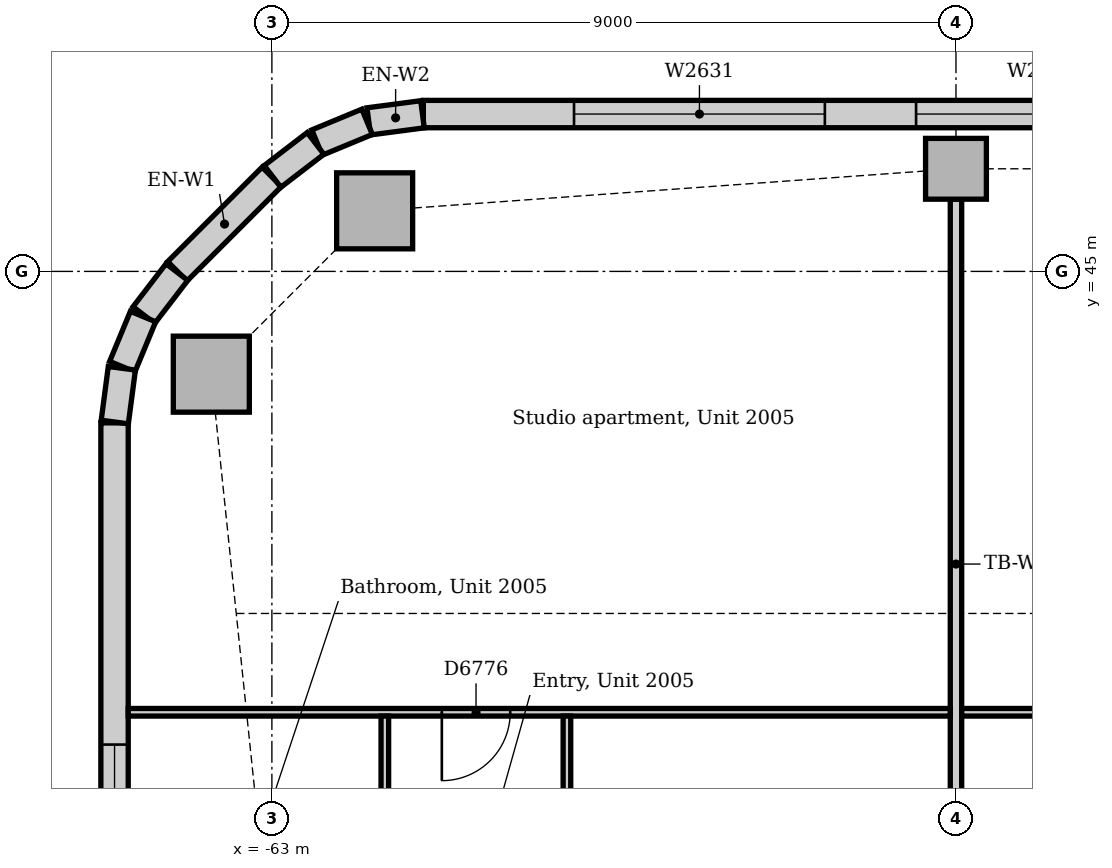
"""IFC4 building model, lengths in metres.
Left out: names, types, materials, properties, quantities, classifications, styles, units other than length and angle.
Written with IfcOpenShell. Run it as: python <this file> out.ifc"""

import sys

from ifc_helpers import new_model, si_unit, direction, frame, frame_2d, origin, origin_2d, place, context, subcontext, project, spatial, rectangle, extrude, element, fill, save


model = new_model("IFC4")
c1 = context("Model", 3, precision=1e-05, world=origin(), true_north=direction((0.0, 1.0)))
c2 = subcontext(c1, "Body", "Model", "MODEL_VIEW")
j1 = project(units=[si_unit("LENGTHUNIT", "METRE"), si_unit("PLANEANGLEUNIT", "RADIAN")], contexts=[c1])
p1 = place(None, origin())
s1 = spatial("IfcSite", under=j1, at=p1, CompositionType="ELEMENT")
p2 = place(p1, origin())
s2 = spatial("IfcBuilding", under=s1, at=p2, CompositionType="ELEMENT")
p3 = place(p2, frame((0.0, 0.0, 87.0)))
s3 = spatial("IfcBuildingStorey", under=s2, at=p3, CompositionType="ELEMENT", Elevation=87.0)
for number, where, z_axis, x_axis in (
    (1, (-61.648, 45.797, 0.0), (0.0, 0.0, 1.0), (1.0, 0.0, 0.0)),
    (2, (-63.797, 43.648, 0.0), (0.0, 0.0, 1.0), (1.0, 0.0, 0.0)),
):
    element("IfcColumn", number, at=place(p3, frame(where, z_axis=z_axis, x_axis=x_axis)), inside=s3, PredefinedType="COLUMN", context=c2, shape_type="SweptSolid", body=[
        extrude(rectangle(XDim=1.0, YDim=1.0, at=origin_2d()), origin(), (0.0, 0.0, 1.0), 3.85),
    ])
p4 = place(p3, frame((-54.0, 46.35, 0.0), z_axis=(0.0, 0.0, 1.0), x_axis=(1.0, 0.0, 0.0)))
e3 = element("IfcColumn", 3, at=p4, inside=s3, PredefinedType="COLUMN", context=c2, shape_type="SweptSolid", body=[
    extrude(rectangle(XDim=0.8, YDim=0.8, at=origin_2d()), origin(), (0.0, 0.0, 1.0), 3.85),
])
p5 = place(p3, frame((-31.243, 47.07, 0.0), z_axis=(0.0, 0.0, 1.0), x_axis=(-1.0, 0.0, 0.0)))
e4 = element("IfcWall", 4, at=p5, inside=s3, PredefinedType="STANDARD", context=c2, shape_type="SweptSolid", body=[
    extrude(rectangle(XDim=29.765, YDim=0.36, at=frame_2d((14.882, 0.0))), origin(), (0.0, 0.0, 1.0), 3.85),
])
p6 = place(p5, frame((1.982, 0.0, 0.9)))
e5 = element("IfcOpeningElement", 5, at=p6, cuts=e4, PredefinedType="OPENING", context=c2, shape_type="SweptSolid", body=[
    extrude(rectangle(XDim=3.3, YDim=1.6, at=frame_2d((1.65, 0.8))), frame((0.0, 0.19, 0.0), z_axis=(0.0, -1.0, 0.0), x_axis=(1.0, 0.0, 0.0)), (0.0, 0.0, 1.0), 0.38),
])
p7 = place(p5, frame((6.482, 0.0, 0.9)))
e6 = element("IfcOpeningElement", 6, at=p7, cuts=e4, PredefinedType="OPENING", context=c2, shape_type="SweptSolid", body=[
    extrude(rectangle(XDim=3.3, YDim=1.6, at=frame_2d((1.65, 0.8))), frame((0.0, 0.19, 0.0), z_axis=(0.0, -1.0, 0.0), x_axis=(1.0, 0.0, 0.0)), (0.0, 0.0, 1.0), 0.38),
])
p8 = place(p5, frame((10.982, 0.0, 0.9)))
e7 = element("IfcOpeningElement", 7, at=p8, cuts=e4, PredefinedType="OPENING", context=c2, shape_type="SweptSolid", body=[
    extrude(rectangle(XDim=3.3, YDim=1.6, at=frame_2d((1.65, 0.8))), frame((0.0, 0.19, 0.0), z_axis=(0.0, -1.0, 0.0), x_axis=(1.0, 0.0, 0.0)), (0.0, 0.0, 1.0), 0.38),
])
p9 = place(p5, frame((15.482, 0.0, 0.9)))
e8 = element("IfcOpeningElement", 8, at=p9, cuts=e4, PredefinedType="OPENING", context=c2, shape_type="SweptSolid", body=[
    extrude(rectangle(XDim=3.3, YDim=1.6, at=frame_2d((1.65, 0.8))), frame((0.0, 0.19, 0.0), z_axis=(0.0, -1.0, 0.0), x_axis=(1.0, 0.0, 0.0)), (0.0, 0.0, 1.0), 0.38),
])
p10 = place(p5, frame((19.982, 0.0, 0.9)))
e9 = element("IfcOpeningElement", 9, at=p10, cuts=e4, PredefinedType="OPENING", context=c2, shape_type="SweptSolid", body=[
    extrude(rectangle(XDim=3.3, YDim=1.6, at=frame_2d((1.65, 0.8))), frame((0.0, 0.19, 0.0), z_axis=(0.0, -1.0, 0.0), x_axis=(1.0, 0.0, 0.0)), (0.0, 0.0, 1.0), 0.38),
])
p11 = place(p5, frame((24.482, 0.0, 0.9)))
e10 = element("IfcOpeningElement", 10, at=p11, cuts=e4, PredefinedType="OPENING", context=c2, shape_type="SweptSolid", body=[
    extrude(rectangle(XDim=3.3, YDim=1.6, at=frame_2d((1.65, 0.8))), frame((0.0, 0.19, 0.0), z_axis=(0.0, -1.0, 0.0), x_axis=(1.0, 0.0, 0.0)), (0.0, 0.0, 1.0), 0.38),
])
p12 = place(p3, frame((-63.001, 46.244, 0.0), z_axis=(0.0, 0.0, 1.0), x_axis=(-0.707106781187, -0.707106781187, 0.0)))
e11 = element("IfcWall", 11, at=p12, inside=s3, PredefinedType="STANDARD", context=c2, shape_type="SweptSolid", body=[
    extrude(rectangle(XDim=1.757, YDim=0.36, at=frame_2d((0.879, 0.0))), origin(), (0.0, 0.0, 1.0), 3.85),
])
p13 = place(p3, frame((-65.07, 43.007, 0.0), z_axis=(0.0, 0.0, 1.0), x_axis=(0.0, -1.0, 0.0)))
e12 = element("IfcWall", 12, at=p13, inside=s3, PredefinedType="STANDARD", context=c2, shape_type="SweptSolid", body=[
    extrude(rectangle(XDim=23.765, YDim=0.36, at=frame_2d((11.882, 0.0))), origin(), (0.0, 0.0, 1.0), 3.85),
])
p14 = place(p13, frame((4.232, 0.0, 0.9)))
e13 = element("IfcOpeningElement", 13, at=p14, cuts=e12, PredefinedType="OPENING", context=c2, shape_type="SweptSolid", body=[
    extrude(rectangle(XDim=1.8, YDim=1.6, at=frame_2d((0.9, 0.8))), frame((0.0, 0.19, 0.0), z_axis=(0.0, -1.0, 0.0), x_axis=(1.0, 0.0, 0.0)), (0.0, 0.0, 1.0), 0.38),
])
p15 = place(p13, frame((9.332, 0.0, 0.9)))
e14 = element("IfcOpeningElement", 14, at=p15, cuts=e12, PredefinedType="OPENING", context=c2, shape_type="SweptSolid", body=[
    extrude(rectangle(XDim=1.8, YDim=1.6, at=frame_2d((0.9, 0.8))), frame((0.0, 0.19, 0.0), z_axis=(0.0, -1.0, 0.0), x_axis=(1.0, 0.0, 0.0)), (0.0, 0.0, 1.0), 0.38),
])
p16 = place(p13, frame((12.482, 0.0, 0.9)))
e15 = element("IfcOpeningElement", 15, at=p16, cuts=e12, PredefinedType="OPENING", context=c2, shape_type="SweptSolid", body=[
    extrude(rectangle(XDim=3.3, YDim=1.6, at=frame_2d((1.65, 0.8))), frame((0.0, 0.19, 0.0), z_axis=(0.0, -1.0, 0.0), x_axis=(1.0, 0.0, 0.0)), (0.0, 0.0, 1.0), 0.38),
])
p17 = place(p13, frame((16.982, 0.0, 0.9)))
e16 = element("IfcOpeningElement", 16, at=p17, cuts=e12, PredefinedType="OPENING", context=c2, shape_type="SweptSolid", body=[
    extrude(rectangle(XDim=3.3, YDim=1.6, at=frame_2d((1.65, 0.8))), frame((0.0, 0.19, 0.0), z_axis=(0.0, -1.0, 0.0), x_axis=(1.0, 0.0, 0.0)), (0.0, 0.0, 1.0), 0.38),
])
for number, where, z_axis, x_axis in (
    (17, (-61.019, 47.067, 0.0), (0.0, 0.0, 1.0), (-0.991, -0.131, 0.0)),
    (18, (-61.747, 46.968, 0.0), (0.0, 0.0, 1.0), (-0.924, -0.383, 0.0)),
):
    element("IfcWall", number, at=place(p3, frame(where, z_axis=z_axis, x_axis=x_axis)), inside=s3, PredefinedType="STANDARD", context=c2, shape_type="SweptSolid", body=[
        extrude(rectangle(XDim=0.713, YDim=0.36, at=frame_2d((0.356, 0.0))), origin(), (0.0, 0.0, 1.0), 3.85),
    ])
for number, where, z_axis, x_axis in (
    (19, (-62.425, 46.684, 0.0), (0.0, 0.0, 1.0), (-0.793, -0.609, 0.0)),
    (20, (-64.25, 44.991, 0.0), (0.0, 0.0, 1.0), (-0.609, -0.793, 0.0)),
):
    element("IfcWall", number, at=place(p3, frame(where, z_axis=z_axis, x_axis=x_axis)), inside=s3, PredefinedType="STANDARD", context=c2, shape_type="SweptSolid", body=[
        extrude(rectangle(XDim=0.713, YDim=0.36, at=frame_2d((0.357, 0.0))), origin(), (0.0, 0.0, 1.0), 3.85),
    ])
for number, where, z_axis, x_axis in (
    (21, (-64.695, 44.406, 0.0), (0.0, 0.0, 1.0), (-0.383, -0.924, 0.0)),
    (22, (-64.974, 43.726, 0.0), (0.0, 0.0, 1.0), (-0.131, -0.991, 0.0)),
):
    element("IfcWall", number, at=place(p3, frame(where, z_axis=z_axis, x_axis=x_axis)), inside=s3, PredefinedType="STANDARD", context=c2, shape_type="SweptSolid", body=[
        extrude(rectangle(XDim=0.713, YDim=0.36, at=frame_2d((0.356, 0.0))), origin(), (0.0, 0.0, 1.0), 3.85),
    ])
p18 = place(p3, frame((-54.0, 36.35, 0.0), z_axis=(0.0, 0.0, 1.0), x_axis=(0.0, 1.0, 0.0)))
e23 = element("IfcWall", 23, at=p18, inside=s3, PredefinedType="PARTITIONING", context=c2, shape_type="SweptSolid", body=[
    extrude(rectangle(XDim=9.6, YDim=0.15, at=frame_2d((4.8, 0.0))), origin(), (0.0, 0.0, 1.0), 3.256),
])
p19 = place(p3, frame((-53.925, 39.2, 0.0), z_axis=(0.0, 0.0, 1.0), x_axis=(1.0, 0.0, 0.0)))
e24 = element("IfcWall", 24, at=p19, inside=s3, PredefinedType="PARTITIONING", context=c2, shape_type="SweptSolid", body=[
    extrude(rectangle(XDim=8.975, YDim=0.1, at=frame_2d((4.487, 0.0))), origin(), (0.0, 0.0, 1.0), 3.85),
])
p20 = place(p19, frame((3.265, 0.0, 0.0)))
e25 = element("IfcOpeningElement", 25, at=p20, cuts=e24, PredefinedType="OPENING", context=c2, shape_type="SweptSolid", body=[
    extrude(rectangle(XDim=0.9, YDim=2.1, at=frame_2d((0.45, 1.05))), frame((0.0, 0.06, 0.0), z_axis=(0.0, -1.0, 0.0), x_axis=(1.0, 0.0, 0.0)), (0.0, 0.0, 1.0), 0.12),
])
p21 = place(p3, frame((-64.89, 39.2, 0.0), z_axis=(0.0, 0.0, 1.0), x_axis=(1.0, 0.0, 0.0)))
e26 = element("IfcWall", 26, at=p21, inside=s3, PredefinedType="PARTITIONING", context=c2, shape_type="SweptSolid", body=[
    extrude(rectangle(XDim=10.815, YDim=0.1, at=frame_2d((5.407, 0.0))), origin(), (0.0, 0.0, 1.0), 3.85),
])
p22 = place(p21, frame((4.126, 0.0, 0.0)))
e27 = element("IfcOpeningElement", 27, at=p22, cuts=e26, PredefinedType="OPENING", context=c2, shape_type="SweptSolid", body=[
    extrude(rectangle(XDim=0.9, YDim=2.1, at=frame_2d((0.45, 1.05))), frame((0.0, 0.06, 0.0), z_axis=(0.0, -1.0, 0.0), x_axis=(1.0, 0.0, 0.0)), (0.0, 0.0, 1.0), 0.12),
])
p23 = place(p3, frame((-61.514, 36.075, 0.0), z_axis=(0.0, 0.0, 1.0), x_axis=(0.0, 1.0, 0.0)))
e28 = element("IfcWall", 28, at=p23, inside=s3, PredefinedType="PARTITIONING", context=c2, shape_type="SweptSolid", body=[
    extrude(rectangle(XDim=3.075, YDim=0.1, at=frame_2d((1.538, 0.0))), origin(), (0.0, 0.0, 1.0), 3.85),
])
p24 = place(p23, frame((1.1, 0.0, 0.0)))
e29 = element("IfcOpeningElement", 29, at=p24, cuts=e28, PredefinedType="OPENING", context=c2, shape_type="SweptSolid", body=[
    extrude(rectangle(XDim=0.9, YDim=2.1, at=frame_2d((0.45, 1.05))), frame((0.0, 0.06, 0.0), z_axis=(0.0, -1.0, 0.0), x_axis=(1.0, 0.0, 0.0)), (0.0, 0.0, 1.0), 0.12),
])
p25 = place(p3, frame((-59.118, 36.075, 0.0), z_axis=(0.0, 0.0, 1.0), x_axis=(0.0, 1.0, 0.0)))
e30 = element("IfcWall", 30, at=p25, inside=s3, PredefinedType="PARTITIONING", context=c2, shape_type="SweptSolid", body=[
    extrude(rectangle(XDim=3.075, YDim=0.1, at=frame_2d((1.538, 0.0))), origin(), (0.0, 0.0, 1.0), 3.85),
])
p26 = place(p25, frame((1.1, 0.0, 0.0)))
e31 = element("IfcOpeningElement", 31, at=p26, cuts=e30, PredefinedType="OPENING", context=c2, shape_type="SweptSolid", body=[
    extrude(rectangle(XDim=0.9, YDim=2.1, at=frame_2d((0.45, 1.05))), frame((0.0, 0.06, 0.0), z_axis=(0.0, -1.0, 0.0), x_axis=(1.0, 0.0, 0.0)), (0.0, 0.0, 1.0), 0.12),
])
p27 = place(p10, origin())
e32 = element("IfcWindow", 32, at=p27, inside=s3, PartitioningType="SINGLE_PANEL", PredefinedType="WINDOW", context=c2, shape_type="SweptSolid", body=[
    extrude(rectangle(XDim=3.3, YDim=1.6, at=frame_2d((1.65, 0.8))), frame((0.0, 0.13, 0.0), z_axis=(0.0, -1.0, 0.0), x_axis=(1.0, 0.0, 0.0)), (0.0, 0.0, 1.0), 0.06),
])
fill(e9, e32)
p28 = place(p11, origin())
e33 = element("IfcWindow", 33, at=p28, inside=s3, PartitioningType="SINGLE_PANEL", PredefinedType="WINDOW", context=c2, shape_type="SweptSolid", body=[
    extrude(rectangle(XDim=3.3, YDim=1.6, at=frame_2d((1.65, 0.8))), frame((0.0, 0.13, 0.0), z_axis=(0.0, -1.0, 0.0), x_axis=(1.0, 0.0, 0.0)), (0.0, 0.0, 1.0), 0.06),
])
fill(e10, e33)
p29 = place(p14, origin())
e34 = element("IfcWindow", 34, at=p29, inside=s3, PartitioningType="SINGLE_PANEL", PredefinedType="WINDOW", context=c2, shape_type="SweptSolid", body=[
    extrude(rectangle(XDim=1.8, YDim=1.6, at=frame_2d((0.9, 0.8))), frame((0.0, 0.13, 0.0), z_axis=(0.0, -1.0, 0.0), x_axis=(1.0, 0.0, 0.0)), (0.0, 0.0, 1.0), 0.06),
])
fill(e13, e34)
p30 = place(p22, frame((0.9, 0.0, 0.0), z_axis=(0.0, 0.0, 1.0), x_axis=(-1.0, 0.0, 0.0)))
e35 = element("IfcDoor", 35, at=p30, inside=s3, OperationType="SINGLE_SWING_RIGHT", PredefinedType="DOOR", context=c2, shape_type="SweptSolid", body=[
    extrude(rectangle(XDim=0.9, YDim=2.1, at=frame_2d((0.45, 1.05))), frame((0.0, 0.025, 0.0), z_axis=(0.0, -1.0, 0.0), x_axis=(1.0, 0.0, 0.0)), (0.0, 0.0, 1.0), 0.05),
])
fill(e27, e35)
save(model, sys.argv[1])
